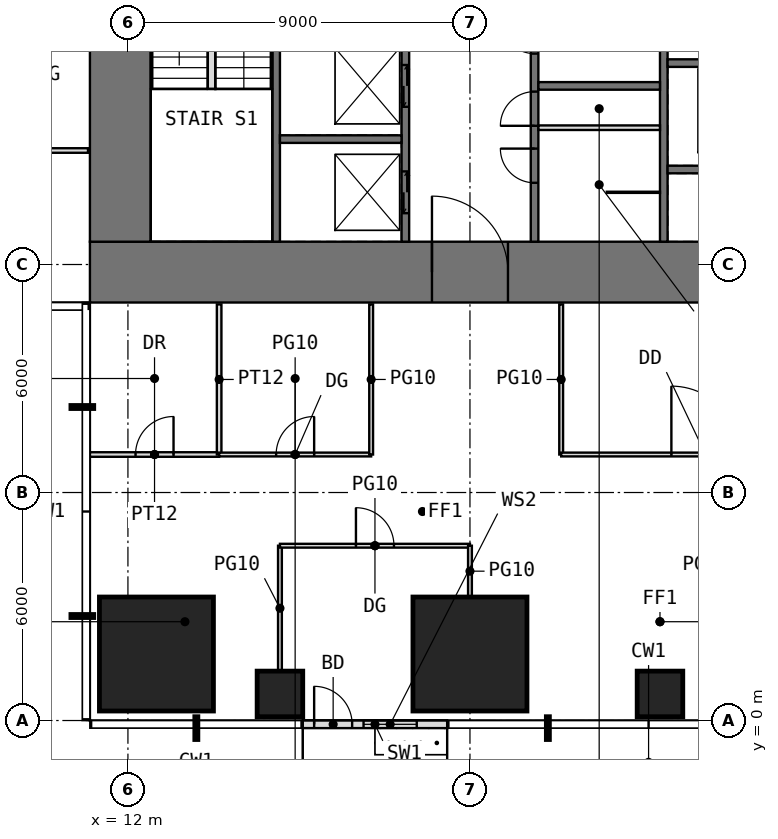
"""IFC4 building model, lengths in metres.
Left out: names, types, materials, properties, quantities, classifications, styles, units other than length and angle.
Written with IfcOpenShell. Run it as: python <this file> out.ifc"""

import sys

from ifc_helpers import new_model, si_unit, direction, frame, frame_2d, origin, origin_2d, place, context, subcontext, project, spatial, rectangle, extrude, element, fill, save


model = new_model("IFC4")
c1 = context("Model", 3, precision=1e-05, world=origin(), true_north=direction((0.0, 1.0)))
c2 = subcontext(c1, "Body", "Model", "MODEL_VIEW")
j1 = project(units=[si_unit("LENGTHUNIT", "METRE"), si_unit("PLANEANGLEUNIT", "RADIAN")], contexts=[c1])
p1 = place(None, origin())
s1 = spatial("IfcSite", under=j1, at=p1, CompositionType="ELEMENT")
p2 = place(p1, origin())
s2 = spatial("IfcBuilding", under=s1, at=p2, CompositionType="ELEMENT")
p3 = place(p2, frame((0.0, 0.0, 108.5)))
s3 = spatial("IfcBuildingStorey", under=s2, at=p3, CompositionType="ELEMENT", Elevation=108.5)
p4 = place(p3, frame((12.75, 1.75, 0.0), z_axis=(0.0, 0.0, 1.0), x_axis=(1.0, 0.0, 0.0)))
e1 = element("IfcColumn", 1, at=p4, inside=s3, PredefinedType="COLUMN", context=c2, shape_type="SweptSolid", body=[
    extrude(rectangle(XDim=3.0, YDim=3.0, at=origin_2d()), origin(), (0.0, 0.0, 1.0), 4.0),
])
p5 = place(p3, frame((16.0, 0.7, 0.0), z_axis=(0.0, 0.0, 1.0), x_axis=(1.0, 0.0, 0.0)))
e2 = element("IfcColumn", 2, at=p5, inside=s3, PredefinedType="COLUMN", context=c2, shape_type="SweptSolid", body=[
    extrude(rectangle(XDim=1.2, YDim=1.2, at=origin_2d()), origin(), (0.0, 0.0, 1.0), 4.0),
])
p6 = place(p3, frame((21.0, 1.75, 0.0), z_axis=(0.0, 0.0, 1.0), x_axis=(1.0, 0.0, 0.0)))
e3 = element("IfcColumn", 3, at=p6, inside=s3, PredefinedType="COLUMN", context=c2, shape_type="SweptSolid", body=[
    extrude(rectangle(XDim=3.0, YDim=3.0, at=origin_2d()), origin(), (0.0, 0.0, 1.0), 4.0),
])
p7 = place(p3, frame((26.0, 0.7, 0.0), z_axis=(0.0, 0.0, 1.0), x_axis=(1.0, 0.0, 0.0)))
e4 = element("IfcColumn", 4, at=p7, inside=s3, PredefinedType="COLUMN", context=c2, shape_type="SweptSolid", body=[
    extrude(rectangle(XDim=1.2, YDim=1.2, at=origin_2d()), origin(), (0.0, 0.0, 1.0), 4.0),
])
p8 = place(p3, frame((16.6, -0.1, 0.0), z_axis=(0.0, 0.0, 1.0), x_axis=(1.0, 0.0, 0.0)))
e5 = element("IfcWall", 5, at=p8, inside=s3, PredefinedType="USERDEFINED", context=c2, shape_type="SweptSolid", body=[
    extrude(rectangle(XDim=3.8, YDim=0.2, at=frame_2d((1.9, 0.0))), origin(), (0.0, 0.0, 1.0), 3.75),
])
p9 = place(p8, frame((0.3, 0.0, 0.0)))
e6 = element("IfcOpeningElement", 6, at=p9, cuts=e5, PredefinedType="OPENING", context=c2, shape_type="SweptSolid", body=[
    extrude(rectangle(XDim=1.0, YDim=2.4, at=frame_2d((0.5, 1.2))), frame((0.0, 0.11, 0.0), z_axis=(0.0, -1.0, 0.0), x_axis=(1.0, 0.0, 0.0)), (0.0, 0.0, 1.0), 0.22),
])
p10 = place(p8, frame((1.6, 0.0, 0.3)))
e7 = element("IfcOpeningElement", 7, at=p10, cuts=e5, PredefinedType="OPENING", context=c2, shape_type="SweptSolid", body=[
    extrude(rectangle(XDim=1.4, YDim=2.7, at=frame_2d((0.7, 1.35))), frame((0.0, 0.11, 0.0), z_axis=(0.0, -1.0, 0.0), x_axis=(1.0, 0.0, 0.0)), (0.0, 0.0, 1.0), 0.22),
])
p11 = place(p3, frame((11.0, 11.8, -0.05), z_axis=(0.0, 0.0, 1.0), x_axis=(1.0, 0.0, 0.0)))
e8 = element("IfcWall", 8, at=p11, inside=s3, PredefinedType="SHEAR", context=c2, shape_type="SweptSolid", body=[
    extrude(rectangle(XDim=20.0, YDim=1.6, at=frame_2d((10.0, 0.0))), origin(), (0.0, 0.0, 1.0), 4.0),
])
p12 = place(p11, frame((9.0, 0.0, 0.05)))
e9 = element("IfcOpeningElement", 9, at=p12, cuts=e8, PredefinedType="OPENING", context=c2, shape_type="SweptSolid", body=[
    extrude(rectangle(XDim=2.0, YDim=2.2, at=frame_2d((1.0, 1.1))), frame((0.0, 0.81, 0.0), z_axis=(0.0, -1.0, 0.0), x_axis=(1.0, 0.0, 0.0)), (0.0, 0.0, 1.0), 1.62),
])
p13 = place(p3, frame((11.8, 12.6, -0.05), z_axis=(0.0, 0.0, 1.0), x_axis=(0.0, 1.0, 0.0)))
e10 = element("IfcWall", 10, at=p13, inside=s3, PredefinedType="SHEAR", context=c2, shape_type="SweptSolid", body=[
    extrude(rectangle(XDim=16.8, YDim=1.6, at=frame_2d((8.4, 0.0))), origin(), (0.0, 0.0, 1.0), 4.0),
])
p14 = place(p13, frame((9.9, 0.0, 0.05)))
e11 = element("IfcOpeningElement", 11, at=p14, cuts=e10, PredefinedType="OPENING", context=c2, shape_type="SweptSolid", body=[
    extrude(rectangle(XDim=1.0, YDim=2.2, at=frame_2d((0.5, 1.1))), frame((0.0, 0.81, 0.0), z_axis=(0.0, -1.0, 0.0), x_axis=(1.0, 0.0, 0.0)), (0.0, 0.0, 1.0), 1.62),
])
p15 = place(p3, frame((15.9, 12.6, -0.05), z_axis=(0.0, 0.0, 1.0), x_axis=(0.0, 1.0, 0.0)))
e12 = element("IfcWall", 12, at=p15, inside=s3, PredefinedType="SHEAR", context=c2, shape_type="SweptSolid", body=[
    extrude(rectangle(XDim=16.8, YDim=0.2, at=frame_2d((8.4, 0.0))), origin(), (0.0, 0.0, 1.0), 4.0),
])
p16 = place(p15, frame((8.9, 0.0, 0.05)))
e13 = element("IfcOpeningElement", 13, at=p16, cuts=e12, PredefinedType="OPENING", context=c2, shape_type="SweptSolid", body=[
    extrude(rectangle(XDim=1.0, YDim=2.2, at=frame_2d((0.5, 1.1))), frame((0.0, 0.11, 0.0), z_axis=(0.0, -1.0, 0.0), x_axis=(1.0, 0.0, 0.0)), (0.0, 0.0, 1.0), 0.22),
])
p17 = place(p3, frame((19.3, 12.6, -0.05), z_axis=(0.0, 0.0, 1.0), x_axis=(0.0, 1.0, 0.0)))
e14 = element("IfcWall", 14, at=p17, inside=s3, PredefinedType="SHEAR", context=c2, shape_type="SweptSolid", body=[
    extrude(rectangle(XDim=16.8, YDim=0.2, at=frame_2d((8.4, 0.0))), origin(), (0.0, 0.0, 1.0), 4.0),
])
p18 = place(p17, frame((8.7, 0.0, 0.05)))
e15 = element("IfcOpeningElement", 15, at=p18, cuts=e14, PredefinedType="OPENING", context=c2, shape_type="SweptSolid", body=[
    extrude(rectangle(XDim=1.0, YDim=2.2, at=frame_2d((0.5, 1.1))), frame((0.0, 0.11, 0.0), z_axis=(0.0, -1.0, 0.0), x_axis=(1.0, 0.0, 0.0)), (0.0, 0.0, 1.0), 0.22),
])
p19 = place(p17, frame((10.85, 0.0, 0.05)))
e16 = element("IfcOpeningElement", 16, at=p19, cuts=e14, PredefinedType="OPENING", context=c2, shape_type="SweptSolid", body=[
    extrude(rectangle(XDim=0.9, YDim=2.2, at=frame_2d((0.45, 1.1))), frame((0.0, 0.11, 0.0), z_axis=(0.0, -1.0, 0.0), x_axis=(1.0, 0.0, 0.0)), (0.0, 0.0, 1.0), 0.22),
])
p20 = place(p17, frame((13.3, 0.0, 0.05)))
e17 = element("IfcOpeningElement", 17, at=p20, cuts=e14, PredefinedType="OPENING", context=c2, shape_type="SweptSolid", body=[
    extrude(rectangle(XDim=1.0, YDim=2.2, at=frame_2d((0.5, 1.1))), frame((0.0, 0.11, 0.0), z_axis=(0.0, -1.0, 0.0), x_axis=(1.0, 0.0, 0.0)), (0.0, 0.0, 1.0), 0.22),
])
p21 = place(p17, frame((15.55, 0.0, 0.05)))
e18 = element("IfcOpeningElement", 18, at=p21, cuts=e14, PredefinedType="OPENING", context=c2, shape_type="SweptSolid", body=[
    extrude(rectangle(XDim=0.9, YDim=2.2, at=frame_2d((0.45, 1.1))), frame((0.0, 0.11, 0.0), z_axis=(0.0, -1.0, 0.0), x_axis=(1.0, 0.0, 0.0)), (0.0, 0.0, 1.0), 0.22),
])
p22 = place(p17, frame((0.75, 0.0, 0.05)))
e19 = element("IfcOpeningElement", 19, at=p22, cuts=e14, PredefinedType="OPENING", context=c2, shape_type="SweptSolid", body=[
    extrude(rectangle(XDim=1.1, YDim=2.2, at=frame_2d((0.55, 1.1))), frame((0.0, 0.11, 0.0), z_axis=(0.0, -1.0, 0.0), x_axis=(1.0, 0.0, 0.0)), (0.0, 0.0, 1.0), 0.22),
])
p23 = place(p17, frame((3.55, 0.0, 0.05)))
e20 = element("IfcOpeningElement", 20, at=p23, cuts=e14, PredefinedType="OPENING", context=c2, shape_type="SweptSolid", body=[
    extrude(rectangle(XDim=1.1, YDim=2.2, at=frame_2d((0.55, 1.1))), frame((0.0, 0.11, 0.0), z_axis=(0.0, -1.0, 0.0), x_axis=(1.0, 0.0, 0.0)), (0.0, 0.0, 1.0), 0.22),
])
p24 = place(p17, frame((6.35, 0.0, 0.05)))
e21 = element("IfcOpeningElement", 21, at=p24, cuts=e14, PredefinedType="OPENING", context=c2, shape_type="SweptSolid", body=[
    extrude(rectangle(XDim=1.1, YDim=2.2, at=frame_2d((0.55, 1.1))), frame((0.0, 0.11, 0.0), z_axis=(0.0, -1.0, 0.0), x_axis=(1.0, 0.0, 0.0)), (0.0, 0.0, 1.0), 0.22),
])
p25 = place(p3, frame((22.7, 12.6, -0.05), z_axis=(0.0, 0.0, 1.0), x_axis=(0.0, 1.0, 0.0)))
e22 = element("IfcWall", 22, at=p25, inside=s3, PredefinedType="SHEAR", context=c2, shape_type="SweptSolid", body=[
    extrude(rectangle(XDim=16.8, YDim=0.2, at=frame_2d((8.4, 0.0))), origin(), (0.0, 0.0, 1.0), 4.0),
])
p26 = place(p25, frame((3.05, 0.0, 0.05)))
e23 = element("IfcOpeningElement", 23, at=p26, cuts=e22, PredefinedType="OPENING", context=c2, shape_type="SweptSolid", body=[
    extrude(rectangle(XDim=0.9, YDim=2.2, at=frame_2d((0.45, 1.1))), frame((0.0, 0.11, 0.0), z_axis=(0.0, -1.0, 0.0), x_axis=(1.0, 0.0, 0.0)), (0.0, 0.0, 1.0), 0.22),
])
p27 = place(p25, frame((7.1, 0.0, 0.05)))
e24 = element("IfcOpeningElement", 24, at=p27, cuts=e22, PredefinedType="OPENING", context=c2, shape_type="SweptSolid", body=[
    extrude(rectangle(XDim=1.0, YDim=2.2, at=frame_2d((0.5, 1.1))), frame((0.0, 0.11, 0.0), z_axis=(0.0, -1.0, 0.0), x_axis=(1.0, 0.0, 0.0)), (0.0, 0.0, 1.0), 0.22),
])
p28 = place(p25, frame((1.55, 0.0, 0.05)))
e25 = element("IfcOpeningElement", 25, at=p28, cuts=e22, PredefinedType="OPENING", context=c2, shape_type="SweptSolid", body=[
    extrude(rectangle(XDim=0.9, YDim=2.2, at=frame_2d((0.45, 1.1))), frame((0.0, 0.11, 0.0), z_axis=(0.0, -1.0, 0.0), x_axis=(1.0, 0.0, 0.0)), (0.0, 0.0, 1.0), 0.22),
])
p29 = place(p25, frame((4.95, 0.0, 0.05)))
e26 = element("IfcOpeningElement", 26, at=p29, cuts=e22, PredefinedType="OPENING", context=c2, shape_type="SweptSolid", body=[
    extrude(rectangle(XDim=0.9, YDim=2.2, at=frame_2d((0.45, 1.1))), frame((0.0, 0.11, 0.0), z_axis=(0.0, -1.0, 0.0), x_axis=(1.0, 0.0, 0.0)), (0.0, 0.0, 1.0), 0.22),
])
p30 = place(p25, frame((9.4, 0.0, 0.05)))
e27 = element("IfcOpeningElement", 27, at=p30, cuts=e22, PredefinedType="OPENING", context=c2, shape_type="SweptSolid", body=[
    extrude(rectangle(XDim=1.0, YDim=2.2, at=frame_2d((0.5, 1.1))), frame((0.0, 0.11, 0.0), z_axis=(0.0, -1.0, 0.0), x_axis=(1.0, 0.0, 0.0)), (0.0, 0.0, 1.0), 0.22),
])
p31 = place(p3, frame((26.1, 12.6, -0.05), z_axis=(0.0, 0.0, 1.0), x_axis=(0.0, 1.0, 0.0)))
e28 = element("IfcWall", 28, at=p31, inside=s3, PredefinedType="SHEAR", context=c2, shape_type="SweptSolid", body=[
    extrude(rectangle(XDim=16.8, YDim=0.2, at=frame_2d((8.4, 0.0))), origin(), (0.0, 0.0, 1.0), 4.0),
])
p32 = place(p31, frame((6.9, 0.0, 0.05)))
e29 = element("IfcOpeningElement", 29, at=p32, cuts=e28, PredefinedType="OPENING", context=c2, shape_type="SweptSolid", body=[
    extrude(rectangle(XDim=1.0, YDim=2.2, at=frame_2d((0.5, 1.1))), frame((0.0, 0.11, 0.0), z_axis=(0.0, -1.0, 0.0), x_axis=(1.0, 0.0, 0.0)), (0.0, 0.0, 1.0), 0.22),
])
for number, where, z_axis, x_axis in (
    (30, (16.0, 15.3, -0.05), (0.0, 0.0, 1.0), (1.0, 0.0, 0.0)),
    (31, (22.8, 16.7, -0.05), (0.0, 0.0, 1.0), (1.0, 0.0, 0.0)),
    (32, (26.2, 14.5, -0.05), (0.0, 0.0, 1.0), (1.0, 0.0, 0.0)),
):
    element("IfcWall", number, at=place(p3, frame(where, z_axis=z_axis, x_axis=x_axis)), inside=s3, PredefinedType="SHEAR", context=c2, shape_type="SweptSolid", body=[
        extrude(rectangle(XDim=3.2, YDim=0.2, at=frame_2d((1.6, 0.0))), origin(), (0.0, 0.0, 1.0), 4.0),
    ])
p33 = place(p3, frame((26.2, 17.3, -0.05), z_axis=(0.0, 0.0, 1.0), x_axis=(1.0, 0.0, 0.0)))
e33 = element("IfcWall", 33, at=p33, inside=s3, PredefinedType="SHEAR", context=c2, shape_type="SweptSolid", body=[
    extrude(rectangle(XDim=3.2, YDim=0.2, at=frame_2d((1.6, 0.0))), origin(), (0.0, 0.0, 1.0), 4.0),
])
p34 = place(p33, frame((1.0, 0.0, 0.05)))
e34 = element("IfcOpeningElement", 34, at=p34, cuts=e33, PredefinedType="OPENING", context=c2, shape_type="SweptSolid", body=[
    extrude(rectangle(XDim=1.2, YDim=2.2, at=frame_2d((0.6, 1.1))), frame((0.0, 0.11, 0.0), z_axis=(0.0, -1.0, 0.0), x_axis=(1.0, 0.0, 0.0)), (0.0, 0.0, 1.0), 0.22),
])
p35 = place(p3, frame((22.8, 15.6, 0.0), z_axis=(0.0, 0.0, 1.0), x_axis=(1.0, 0.0, 0.0)))
e35 = element("IfcWall", 35, at=p35, inside=s3, PredefinedType="PARTITIONING", context=c2, shape_type="SweptSolid", body=[
    extrude(rectangle(XDim=3.2, YDim=0.12, at=frame_2d((1.6, 0.0))), origin(), (0.0, 0.0, 1.0), 3.75),
])
p36 = place(p3, frame((24.6, 13.9, 0.0), z_axis=(0.0, 0.0, 1.0), x_axis=(1.0, 0.0, 0.0)))
e36 = element("IfcWall", 36, at=p36, inside=s3, PredefinedType="PARTITIONING", context=c2, shape_type="SweptSolid", body=[
    extrude(rectangle(XDim=1.4, YDim=0.03, at=frame_2d((0.7, 0.0))), origin(), (0.0, 0.0, 1.0), 3.75),
])
p37 = place(p3, frame((7.0, 15.0, 0.0), z_axis=(0.0, 0.0, 1.0), x_axis=(1.0, 0.0, 0.0)))
e37 = element("IfcWall", 37, at=p37, inside=s3, PredefinedType="PARTITIONING", context=c2, shape_type="SweptSolid", body=[
    extrude(rectangle(XDim=3.95, YDim=0.12, at=frame_2d((1.975, 0.0))), origin(), (0.0, 0.0, 1.0), 3.75),
])
p38 = place(p3, frame((11.0, 7.0, 0.0), z_axis=(0.0, 0.0, 1.0), x_axis=(1.0, 0.0, 0.0)))
e38 = element("IfcWall", 38, at=p38, inside=s3, PredefinedType="PARTITIONING", context=c2, shape_type="SweptSolid", body=[
    extrude(rectangle(XDim=3.4, YDim=0.12, at=frame_2d((1.7, 0.0))), origin(), (0.0, 0.0, 1.0), 3.75),
])
p39 = place(p38, frame((1.2, 0.0, 0.0)))
e39 = element("IfcOpeningElement", 39, at=p39, cuts=e38, PredefinedType="OPENING", context=c2, shape_type="SweptSolid", body=[
    extrude(rectangle(XDim=1.0, YDim=2.2, at=frame_2d((0.5, 1.1))), frame((0.0, 0.07, 0.0), z_axis=(0.0, -1.0, 0.0), x_axis=(1.0, 0.0, 0.0)), (0.0, 0.0, 1.0), 0.14),
])
p40 = place(p3, frame((14.4, 7.0, 0.0), z_axis=(0.0, 0.0, 1.0), x_axis=(0.0, 1.0, 0.0)))
e40 = element("IfcWall", 40, at=p40, inside=s3, PredefinedType="PARTITIONING", context=c2, shape_type="SweptSolid", body=[
    extrude(rectangle(XDim=3.95, YDim=0.12, at=frame_2d((1.975, 0.0))), origin(), (0.0, 0.0, 1.0), 3.75),
])
p41 = place(p3, frame((14.4, 7.0, 0.0), z_axis=(0.0, 0.0, 1.0), x_axis=(1.0, 0.0, 0.0)))
e41 = element("IfcWall", 41, at=p41, inside=s3, PredefinedType="PARTITIONING", context=c2, shape_type="SweptSolid", body=[
    extrude(rectangle(XDim=4.0, YDim=0.1, at=frame_2d((2.0, 0.0))), origin(), (0.0, 0.0, 1.0), 3.75),
])
p42 = place(p41, frame((1.5, 0.0, 0.0)))
e42 = element("IfcOpeningElement", 42, at=p42, cuts=e41, PredefinedType="OPENING", context=c2, shape_type="SweptSolid", body=[
    extrude(rectangle(XDim=1.0, YDim=2.4, at=frame_2d((0.5, 1.2))), frame((0.0, 0.06, 0.0), z_axis=(0.0, -1.0, 0.0), x_axis=(1.0, 0.0, 0.0)), (0.0, 0.0, 1.0), 0.12),
])
p43 = place(p3, frame((16.0, 1.31, 0.0), z_axis=(0.0, 0.0, 1.0), x_axis=(0.0, 1.0, 0.0)))
e43 = element("IfcWall", 43, at=p43, inside=s3, PredefinedType="PARTITIONING", context=c2, shape_type="SweptSolid", body=[
    extrude(rectangle(XDim=3.29, YDim=0.1, at=frame_2d((1.645, 0.0))), origin(), (0.0, 0.0, 1.0), 3.75),
])
p44 = place(p3, frame((16.0, 4.6, 0.0), z_axis=(0.0, 0.0, 1.0), x_axis=(1.0, 0.0, 0.0)))
e44 = element("IfcWall", 44, at=p44, inside=s3, PredefinedType="PARTITIONING", context=c2, shape_type="SweptSolid", body=[
    extrude(rectangle(XDim=5.0, YDim=0.1, at=frame_2d((2.5, 0.0))), origin(), (0.0, 0.0, 1.0), 3.75),
])
p45 = place(p44, frame((2.0, 0.0, 0.0)))
e45 = element("IfcOpeningElement", 45, at=p45, cuts=e44, PredefinedType="OPENING", context=c2, shape_type="SweptSolid", body=[
    extrude(rectangle(XDim=1.0, YDim=2.4, at=frame_2d((0.5, 1.2))), frame((0.0, 0.06, 0.0), z_axis=(0.0, -1.0, 0.0), x_axis=(1.0, 0.0, 0.0)), (0.0, 0.0, 1.0), 0.12),
])
p46 = place(p3, frame((18.4, 7.0, 0.0), z_axis=(0.0, 0.0, 1.0), x_axis=(0.0, 1.0, 0.0)))
e46 = element("IfcWall", 46, at=p46, inside=s3, PredefinedType="PARTITIONING", context=c2, shape_type="SweptSolid", body=[
    extrude(rectangle(XDim=3.95, YDim=0.1, at=frame_2d((1.975, 0.0))), origin(), (0.0, 0.0, 1.0), 3.75),
])
p47 = place(p3, frame((21.0, 3.26, 0.0), z_axis=(0.0, 0.0, 1.0), x_axis=(0.0, 1.0, 0.0)))
e47 = element("IfcWall", 47, at=p47, inside=s3, PredefinedType="PARTITIONING", context=c2, shape_type="SweptSolid", body=[
    extrude(rectangle(XDim=1.34, YDim=0.1, at=frame_2d((0.67, 0.0))), origin(), (0.0, 0.0, 1.0), 3.75),
])
p48 = place(p3, frame((23.4, 7.0, 0.0), z_axis=(0.0, 0.0, 1.0), x_axis=(0.0, 1.0, 0.0)))
e48 = element("IfcWall", 48, at=p48, inside=s3, PredefinedType="PARTITIONING", context=c2, shape_type="SweptSolid", body=[
    extrude(rectangle(XDim=3.95, YDim=0.1, at=frame_2d((1.975, 0.0))), origin(), (0.0, 0.0, 1.0), 3.75),
])
p49 = place(p3, frame((23.4, 7.0, 0.0), z_axis=(0.0, 0.0, 1.0), x_axis=(1.0, 0.0, 0.0)))
e49 = element("IfcWall", 49, at=p49, inside=s3, PredefinedType="PARTITIONING", context=c2, shape_type="SweptSolid", body=[
    extrude(rectangle(XDim=7.6, YDim=0.1, at=frame_2d((3.8, 0.0))), origin(), (0.0, 0.0, 1.0), 3.75),
])
p50 = place(p49, frame((2.9, 0.0, 0.0)))
e50 = element("IfcOpeningElement", 50, at=p50, cuts=e49, PredefinedType="OPENING", context=c2, shape_type="SweptSolid", body=[
    extrude(rectangle(XDim=1.8, YDim=2.4, at=frame_2d((0.9, 1.2))), frame((0.0, 0.06, 0.0), z_axis=(0.0, -1.0, 0.0), x_axis=(1.0, 0.0, 0.0)), (0.0, 0.0, 1.0), 0.12),
])
p51 = place(p3, frame((14.2, 16.62, 0.0), z_axis=(0.0, 0.0, 1.0), x_axis=(0.0, 1.0, 0.0)))
e51 = element("IfcWall", 51, at=p51, inside=s3, PredefinedType="PARTITIONING", context=c2, shape_type="SweptSolid", body=[
    extrude(rectangle(XDim=3.08, YDim=0.2, at=frame_2d((1.54, 0.0))), origin(), (0.0, 0.0, 1.0), 4.0),
])
p52 = place(p9, origin())
e52 = element("IfcDoor", 52, at=p52, inside=s3, OperationType="SINGLE_SWING_LEFT", PredefinedType="DOOR", context=c2, shape_type="SweptSolid", body=[
    extrude(rectangle(XDim=1.0, YDim=2.4, at=frame_2d((0.5, 1.2))), frame((0.0, 0.025, 0.0), z_axis=(0.0, -1.0, 0.0), x_axis=(1.0, 0.0, 0.0)), (0.0, 0.0, 1.0), 0.05),
])
fill(e6, e52)
p53 = place(p10, origin())
e53 = element("IfcWindow", 53, at=p53, inside=s3, PartitioningType="SINGLE_PANEL", PredefinedType="WINDOW", context=c2, shape_type="SweptSolid", body=[
    extrude(rectangle(XDim=1.4, YDim=2.7, at=frame_2d((0.7, 1.35))), frame((0.0, 0.03, 0.0), z_axis=(0.0, -1.0, 0.0), x_axis=(1.0, 0.0, 0.0)), (0.0, 0.0, 1.0), 0.06),
])
fill(e7, e53)
p54 = place(p12, origin())
e54 = element("IfcDoor", 54, at=p54, inside=s3, OperationType="DOUBLE_DOOR_SINGLE_SWING", PredefinedType="DOOR", context=c2, shape_type="SweptSolid", body=[
    extrude(rectangle(XDim=2.0, YDim=2.2, at=frame_2d((1.0, 1.1))), frame((0.0, 0.025, 0.0), z_axis=(0.0, -1.0, 0.0), x_axis=(1.0, 0.0, 0.0)), (0.0, 0.0, 1.0), 0.05),
])
fill(e9, e54)
p55 = place(p26, origin())
e55 = element("IfcDoor", 55, at=p55, inside=s3, OperationType="SINGLE_SWING_LEFT", PredefinedType="DOOR", context=c2, shape_type="SweptSolid", body=[
    extrude(rectangle(XDim=0.9, YDim=2.2, at=frame_2d((0.45, 1.1))), frame((0.0, 0.025, 0.0), z_axis=(0.0, -1.0, 0.0), x_axis=(1.0, 0.0, 0.0)), (0.0, 0.0, 1.0), 0.05),
])
fill(e23, e55)
p56 = place(p28, origin())
e56 = element("IfcDoor", 56, at=p56, inside=s3, OperationType="SINGLE_SWING_RIGHT", PredefinedType="DOOR", context=c2, shape_type="SweptSolid", body=[
    extrude(rectangle(XDim=0.9, YDim=2.2, at=frame_2d((0.45, 1.1))), frame((0.0, 0.025, 0.0), z_axis=(0.0, -1.0, 0.0), x_axis=(1.0, 0.0, 0.0)), (0.0, 0.0, 1.0), 0.05),
])
fill(e25, e56)
p57 = place(p29, origin())
e57 = element("IfcDoor", 57, at=p57, inside=s3, OperationType="SINGLE_SWING_RIGHT", PredefinedType="DOOR", context=c2, shape_type="SweptSolid", body=[
    extrude(rectangle(XDim=0.9, YDim=2.2, at=frame_2d((0.45, 1.1))), frame((0.0, 0.025, 0.0), z_axis=(0.0, -1.0, 0.0), x_axis=(1.0, 0.0, 0.0)), (0.0, 0.0, 1.0), 0.05),
])
fill(e26, e57)
p58 = place(p39, origin())
e58 = element("IfcDoor", 58, at=p58, inside=s3, OperationType="SINGLE_SWING_RIGHT", PredefinedType="DOOR", context=c2, shape_type="SweptSolid", body=[
    extrude(rectangle(XDim=1.0, YDim=2.2, at=frame_2d((0.5, 1.1))), frame((0.0, 0.025, 0.0), z_axis=(0.0, -1.0, 0.0), x_axis=(1.0, 0.0, 0.0)), (0.0, 0.0, 1.0), 0.05),
])
fill(e39, e58)
p59 = place(p42, origin())
e59 = element("IfcDoor", 59, at=p59, inside=s3, OperationType="SINGLE_SWING_RIGHT", PredefinedType="DOOR", context=c2, shape_type="SweptSolid", body=[
    extrude(rectangle(XDim=1.0, YDim=2.4, at=frame_2d((0.5, 1.2))), frame((0.0, 0.025, 0.0), z_axis=(0.0, -1.0, 0.0), x_axis=(1.0, 0.0, 0.0)), (0.0, 0.0, 1.0), 0.05),
])
fill(e42, e59)
p60 = place(p50, origin())
e60 = element("IfcDoor", 60, at=p60, inside=s3, OperationType="DOUBLE_DOOR_SINGLE_SWING", PredefinedType="DOOR", context=c2, shape_type="SweptSolid", body=[
    extrude(rectangle(XDim=1.8, YDim=2.4, at=frame_2d((0.9, 1.2))), frame((0.0, 0.025, 0.0), z_axis=(0.0, -1.0, 0.0), x_axis=(1.0, 0.0, 0.0)), (0.0, 0.0, 1.0), 0.05),
])
fill(e50, e60)
p61 = place(p45, origin())
e61 = element("IfcDoor", 61, at=p61, inside=s3, OperationType="SINGLE_SWING_LEFT", PredefinedType="DOOR", context=c2, shape_type="SweptSolid", body=[
    extrude(rectangle(XDim=1.0, YDim=2.4, at=frame_2d((0.5, 1.2))), frame((0.0, 0.025, 0.0), z_axis=(0.0, -1.0, 0.0), x_axis=(1.0, 0.0, 0.0)), (0.0, 0.0, 1.0), 0.05),
])
fill(e45, e61)
p62 = place(p22, origin())
e62 = element("IfcDoor", 62, at=p62, inside=s3, OperationType="DOUBLE_DOOR_SLIDING", PredefinedType="DOOR", context=c2, shape_type="SweptSolid", body=[
    extrude(rectangle(XDim=1.1, YDim=2.2, at=frame_2d((0.55, 1.1))), frame((0.0, 0.025, 0.0), z_axis=(0.0, -1.0, 0.0), x_axis=(1.0, 0.0, 0.0)), (0.0, 0.0, 1.0), 0.05),
])
fill(e19, e62)
p63 = place(p23, origin())
e63 = element("IfcDoor", 63, at=p63, inside=s3, OperationType="DOUBLE_DOOR_SLIDING", PredefinedType="DOOR", context=c2, shape_type="SweptSolid", body=[
    extrude(rectangle(XDim=1.1, YDim=2.2, at=frame_2d((0.55, 1.1))), frame((0.0, 0.025, 0.0), z_axis=(0.0, -1.0, 0.0), x_axis=(1.0, 0.0, 0.0)), (0.0, 0.0, 1.0), 0.05),
])
fill(e20, e63)
save(model, sys.argv[1])
